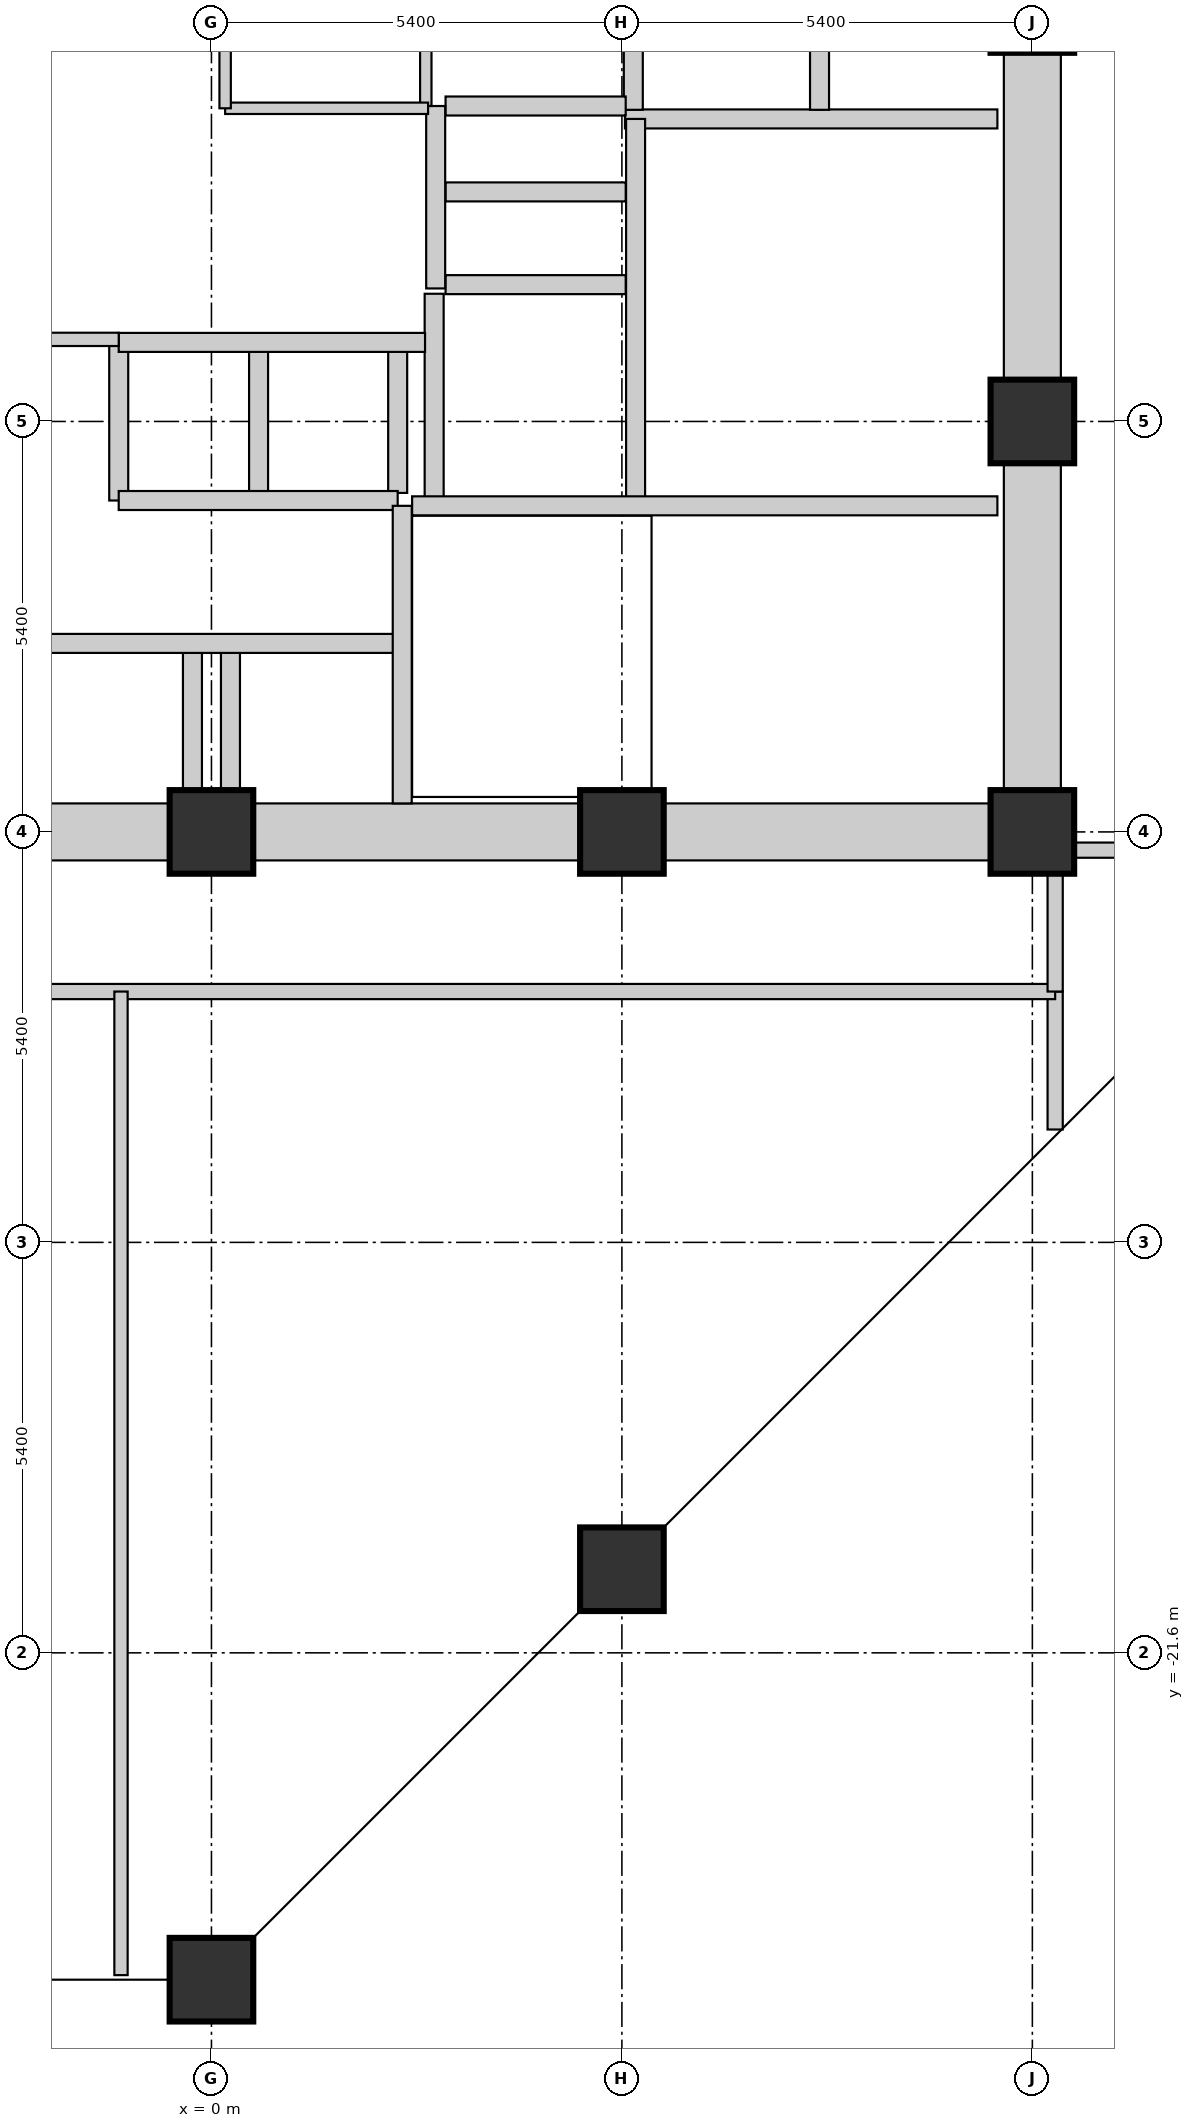
"""IFC4 building model, lengths in metres.
Left out: names, types, materials, properties, quantities, classifications, styles, units other than length and angle.
Written with IfcOpenShell. Run it as: python <this file> out.ifc"""

import sys

from ifc_helpers import new_model, si_unit, direction, frame, frame_2d, origin, origin_2d, place, context, subcontext, project, spatial, rectangle, extrude, element, fill, save


model = new_model("IFC4")
c1 = context("Model", 3, precision=1e-05, world=origin(), true_north=direction((0.0, 1.0)))
c2 = subcontext(c1, "Body", "Model", "MODEL_VIEW")
j1 = project(units=[si_unit("LENGTHUNIT", "METRE"), si_unit("PLANEANGLEUNIT", "RADIAN")], contexts=[c1])
p1 = place(None, origin())
s1 = spatial("IfcSite", under=j1, at=p1, CompositionType="ELEMENT")
p2 = place(p1, origin())
s2 = spatial("IfcBuilding", under=s1, at=p2, CompositionType="ELEMENT")
p3 = place(p2, frame((0.0, 0.0, 83.25)))
s3 = spatial("IfcBuildingStorey", under=s2, at=p3, CompositionType="ELEMENT", Elevation=83.25)
for number, where, z_axis, x_axis in (
    (1, (0.0, -25.9, 0.0), (0.0, 0.0, 1.0), (1.0, 0.0, 0.0)),
    (2, (0.0, -10.8, 0.0), (0.0, 0.0, 1.0), (1.0, 0.0, 0.0)),
    (3, (5.4, -20.5, 0.0), (0.0, 0.0, 1.0), (1.0, 0.0, 0.0)),
    (4, (5.4, -10.8, 0.0), (0.0, 0.0, 1.0), (1.0, 0.0, 0.0)),
    (5, (10.8, -10.8, 0.0), (0.0, 0.0, 1.0), (1.0, 0.0, 0.0)),
    (6, (10.8, -5.4, 0.0), (0.0, 0.0, 1.0), (1.0, 0.0, 0.0)),
):
    element("IfcColumn", number, at=place(p3, frame(where, z_axis=z_axis, x_axis=x_axis)), inside=s3, PredefinedType="COLUMN", context=c2, shape_type="SweptSolid", body=[
        extrude(rectangle(XDim=1.1, YDim=1.1, at=origin_2d()), origin(), (0.0, 0.0, 1.0), 3.75),
    ])
for number, where, z_axis, x_axis in (
    (7, (10.8, -10.24, 0.0), (0.0, 0.0, 1.0), (0.0, 1.0, 0.0)),
    (8, (-4.84, -10.8, 0.0), (0.0, 0.0, 1.0), (1.0, 0.0, 0.0)),
):
    element("IfcWall", number, at=place(p3, frame(where, z_axis=z_axis, x_axis=x_axis)), inside=s3, PredefinedType="SHEAR", context=c2, shape_type="SweptSolid", body=[
        extrude(rectangle(XDim=4.28, YDim=0.75, at=frame_2d((2.14, 0.0))), origin(), (0.0, 0.0, 1.0), 3.75),
    ])
p4 = place(p3, frame((10.8, -4.84, 0.0), z_axis=(0.0, 0.0, 1.0), x_axis=(0.0, 1.0, 0.0)))
e9 = element("IfcWall", 9, at=p4, inside=s3, PredefinedType="SHEAR", context=c2, shape_type="SweptSolid", body=[
    extrude(rectangle(XDim=4.28, YDim=0.75, at=frame_2d((2.14, 0.0))), origin(), (0.0, 0.0, 1.0), 3.75),
])
p5 = place(p4, frame((1.59, 0.0, 0.0)))
e10 = element("IfcOpeningElement", 10, at=p5, cuts=e9, PredefinedType="OPENING", context=c2, shape_type="SweptSolid", body=[
    extrude(rectangle(XDim=1.1, YDim=2.1, at=frame_2d((0.55, 1.05))), frame((0.0, 0.385, 0.0), z_axis=(0.0, -1.0, 0.0), x_axis=(1.0, 0.0, 0.0)), (0.0, 0.0, 1.0), 0.77),
])
for number, where, z_axis, x_axis in (
    (11, (0.56, -10.8, 0.0), (0.0, 0.0, 1.0), (1.0, 0.0, 0.0)),
    (12, (5.96, -10.8, 0.0), (0.0, 0.0, 1.0), (1.0, 0.0, 0.0)),
):
    element("IfcWall", number, at=place(p3, frame(where, z_axis=z_axis, x_axis=x_axis)), inside=s3, PredefinedType="SHEAR", context=c2, shape_type="SweptSolid", body=[
        extrude(rectangle(XDim=4.28, YDim=0.75, at=frame_2d((2.14, 0.0))), origin(), (0.0, 0.0, 1.0), 3.75),
    ])
p6 = place(p3, frame((2.93, -6.51, 0.0), z_axis=(0.0, 0.0, 1.0), x_axis=(0.0, 1.0, 0.0)))
e13 = element("IfcWall", 13, at=p6, inside=s3, PredefinedType="SHEAR", context=c2, shape_type="SweptSolid", body=[
    extrude(rectangle(XDim=2.79, YDim=0.25, at=frame_2d((1.395, 0.0))), origin(), (0.0, 0.0, 1.0), 3.75),
])
p7 = place(p3, frame((5.44, -1.42, 0.0), z_axis=(0.0, 0.0, 1.0), x_axis=(1.0, 0.0, 0.0)))
e14 = element("IfcWall", 14, at=p7, inside=s3, PredefinedType="SHEAR", context=c2, shape_type="SweptSolid", body=[
    extrude(rectangle(XDim=4.9, YDim=0.25, at=frame_2d((2.45, 0.0))), origin(), (0.0, 0.0, 1.0), 3.75),
])
p8 = place(p3, frame((3.08, -3.6, 0.0), z_axis=(0.0, 0.0, 1.0), x_axis=(1.0, 0.0, 0.0)))
e15 = element("IfcWall", 15, at=p8, inside=s3, PredefinedType="SHEAR", context=c2, shape_type="SweptSolid", body=[
    extrude(rectangle(XDim=2.37, YDim=0.25, at=frame_2d((1.185, 0.0))), origin(), (0.0, 0.0, 1.0), 3.75),
])
p9 = place(p3, frame((5.58, -6.51, 0.0), z_axis=(0.0, 0.0, 1.0), x_axis=(0.0, 1.0, 0.0)))
e16 = element("IfcWall", 16, at=p9, inside=s3, PredefinedType="SHEAR", context=c2, shape_type="SweptSolid", body=[
    extrude(rectangle(XDim=5.09, YDim=0.25, at=frame_2d((2.545, 0.0))), origin(), (0.0, 0.0, 1.0), 3.75),
])
p10 = place(p9, frame((0.85, 0.0, 0.0)))
e17 = element("IfcOpeningElement", 17, at=p10, cuts=e16, PredefinedType="OPENING", context=c2, shape_type="SweptSolid", body=[
    extrude(rectangle(XDim=1.1, YDim=2.1, at=frame_2d((0.55, 1.05))), frame((0.0, 0.135, 0.0), z_axis=(0.0, -1.0, 0.0), x_axis=(1.0, 0.0, 0.0)), (0.0, 0.0, 1.0), 0.27),
])
for number, where, z_axis, x_axis in (
    (18, (0.62, -6.34, 0.0), (0.0, 0.0, 1.0), (0.0, 1.0, 0.0)),
    (19, (2.45, -6.34, 0.0), (0.0, 0.0, 1.0), (0.0, 1.0, 0.0)),
):
    element("IfcWall", number, at=place(p3, frame(where, z_axis=z_axis, x_axis=x_axis)), inside=s3, PredefinedType="SHEAR", context=c2, shape_type="SweptSolid", body=[
        extrude(rectangle(XDim=1.88, YDim=0.25, at=frame_2d((0.94, 0.0))), origin(), (0.0, 0.0, 1.0), 3.75),
    ])
for number, where, z_axis, x_axis in (
    (20, (-0.25, -10.25, 0.0), (0.0, 0.0, 1.0), (0.0, 1.0, 0.0)),
    (21, (0.25, -10.25, 0.0), (0.0, 0.0, 1.0), (0.0, 1.0, 0.0)),
):
    element("IfcWall", number, at=place(p3, frame(where, z_axis=z_axis, x_axis=x_axis)), inside=s3, PredefinedType="SHEAR", context=c2, shape_type="SweptSolid", body=[
        extrude(rectangle(XDim=1.81, YDim=0.25, at=frame_2d((0.905, 0.0))), origin(), (0.0, 0.0, 1.0), 3.75),
    ])
p11 = place(p3, frame((-1.22, -6.44, 0.0), z_axis=(0.0, 0.0, 1.0), x_axis=(0.0, 1.0, 0.0)))
e22 = element("IfcWall", 22, at=p11, inside=s3, PredefinedType="SHEAR", context=c2, shape_type="SweptSolid", body=[
    extrude(rectangle(XDim=2.08, YDim=0.25, at=frame_2d((1.04, 0.0))), origin(), (0.0, 0.0, 1.0), 3.75),
])
p12 = place(p3, frame((-1.22, -6.44, 0.0), z_axis=(0.0, 0.0, 1.0), x_axis=(1.0, 0.0, 0.0)))
e23 = element("IfcWall", 23, at=p12, inside=s3, PredefinedType="SHEAR", context=c2, shape_type="SweptSolid", body=[
    extrude(rectangle(XDim=3.67, YDim=0.25, at=frame_2d((1.835, 0.0))), origin(), (0.0, 0.0, 1.0), 3.75),
])
p13 = place(p3, frame((-2.48, -8.32, 0.0), z_axis=(0.0, 0.0, 1.0), x_axis=(1.0, 0.0, 0.0)))
e24 = element("IfcWall", 24, at=p13, inside=s3, PredefinedType="SHEAR", context=c2, shape_type="SweptSolid", body=[
    extrude(rectangle(XDim=4.93, YDim=0.25, at=frame_2d((2.465, 0.0))), origin(), (0.0, 0.0, 1.0), 3.75),
])
p14 = place(p3, frame((-1.22, -4.36, 0.0), z_axis=(0.0, 0.0, 1.0), x_axis=(1.0, 0.0, 0.0)))
e25 = element("IfcWall", 25, at=p14, inside=s3, PredefinedType="SHEAR", context=c2, shape_type="SweptSolid", body=[
    extrude(rectangle(XDim=4.03, YDim=0.25, at=frame_2d((2.015, 0.0))), origin(), (0.0, 0.0, 1.0), 3.75),
])
for number, where, z_axis, x_axis in (
    (26, (5.55, -1.3, 0.0), (0.0, 0.0, 1.0), (0.0, 1.0, 0.0)),
    (27, (8.0, -1.3, 0.0), (0.0, 0.0, 1.0), (0.0, 1.0, 0.0)),
):
    element("IfcWall", number, at=place(p3, frame(where, z_axis=z_axis, x_axis=x_axis)), inside=s3, PredefinedType="SHEAR", context=c2, shape_type="SweptSolid", body=[
        extrude(rectangle(XDim=2.04, YDim=0.25, at=frame_2d((1.02, 0.0))), origin(), (0.0, 0.0, 1.0), 3.75),
    ])
for number, where, z_axis, x_axis in (
    (28, (3.08, -2.38, 0.0), (0.0, 0.0, 1.0), (1.0, 0.0, 0.0)),
    (29, (3.08, -1.25, 0.0), (0.0, 0.0, 1.0), (1.0, 0.0, 0.0)),
):
    element("IfcWall", number, at=place(p3, frame(where, z_axis=z_axis, x_axis=x_axis)), inside=s3, PredefinedType="SHEAR", context=c2, shape_type="SweptSolid", body=[
        extrude(rectangle(XDim=2.37, YDim=0.25, at=frame_2d((1.185, 0.0))), origin(), (0.0, 0.0, 1.0), 3.75),
    ])
p15 = place(p3, frame((2.95, -3.65, 0.0), z_axis=(0.0, 0.0, 1.0), x_axis=(0.0, 1.0, 0.0)))
e30 = element("IfcWall", 30, at=p15, inside=s3, PredefinedType="SHEAR", context=c2, shape_type="SweptSolid", body=[
    extrude(rectangle(XDim=2.4, YDim=0.25, at=frame_2d((1.2, 0.0))), origin(), (0.0, 0.0, 1.0), 3.75),
])
p16 = place(p15, frame((0.775, 0.0, 0.0)))
e31 = element("IfcOpeningElement", 31, at=p16, cuts=e30, PredefinedType="OPENING", context=c2, shape_type="SweptSolid", body=[
    extrude(rectangle(XDim=0.85, YDim=2.1, at=frame_2d((0.425, 1.05))), frame((0.0, 0.135, 0.0), z_axis=(0.0, -1.0, 0.0), x_axis=(1.0, 0.0, 0.0)), (0.0, 0.0, 1.0), 0.27),
])
p17 = place(p3, frame((2.64, -6.51, 0.0), z_axis=(0.0, 0.0, 1.0), x_axis=(1.0, 0.0, 0.0)))
e32 = element("IfcWall", 32, at=p17, inside=s3, PredefinedType="SHEAR", context=c2, shape_type="SweptSolid", body=[
    extrude(rectangle(XDim=7.7, YDim=0.25, at=frame_2d((3.85, 0.0))), origin(), (0.0, 0.0, 1.0), 3.75),
])
p18 = place(p17, frame((6.0, 0.0, 0.0)))
e33 = element("IfcOpeningElement", 33, at=p18, cuts=e32, PredefinedType="OPENING", context=c2, shape_type="SweptSolid", body=[
    extrude(rectangle(XDim=0.95, YDim=2.1, at=frame_2d((0.475, 1.05))), frame((0.0, 0.135, 0.0), z_axis=(0.0, -1.0, 0.0), x_axis=(1.0, 0.0, 0.0)), (0.0, 0.0, 1.0), 0.27),
])
p19 = place(p3, frame((2.51, -10.425, 0.0), z_axis=(0.0, 0.0, 1.0), x_axis=(0.0, 1.0, 0.0)))
e34 = element("IfcWall", 34, at=p19, inside=s3, PredefinedType="SHEAR", context=c2, shape_type="SweptSolid", body=[
    extrude(rectangle(XDim=3.915, YDim=0.25, at=frame_2d((1.958, 0.0))), origin(), (0.0, 0.0, 1.0), 3.75),
])
p20 = place(p3, frame((2.82, -1.25, 0.0), z_axis=(0.0, 0.0, 1.0), x_axis=(0.0, 1.0, 0.0)))
e35 = element("IfcWall", 35, at=p20, inside=s3, PredefinedType="PARTITIONING", context=c2, shape_type="SweptSolid", body=[
    extrude(rectangle(XDim=2.77, YDim=0.15, at=frame_2d((1.385, 0.0))), origin(), (0.0, 0.0, 1.0), 3.57),
])
p21 = place(p3, frame((0.18, -1.28, 0.0), z_axis=(0.0, 0.0, 1.0), x_axis=(1.0, 0.0, 0.0)))
e36 = element("IfcWall", 36, at=p21, inside=s3, PredefinedType="PARTITIONING", context=c2, shape_type="SweptSolid", body=[
    extrude(rectangle(XDim=2.67, YDim=0.15, at=frame_2d((1.335, 0.0))), origin(), (0.0, 0.0, 1.0), 3.57),
])
p22 = place(p3, frame((0.18, -1.28, 0.0), z_axis=(0.0, 0.0, 1.0), x_axis=(0.0, 1.0, 0.0)))
e37 = element("IfcWall", 37, at=p22, inside=s3, PredefinedType="PARTITIONING", context=c2, shape_type="SweptSolid", body=[
    extrude(rectangle(XDim=2.8, YDim=0.15, at=frame_2d((1.4, 0.0))), origin(), (0.0, 0.0, 1.0), 3.57),
])
p23 = place(p22, frame((0.85, 0.0, 0.0)))
e38 = element("IfcOpeningElement", 38, at=p23, cuts=e37, PredefinedType="OPENING", context=c2, shape_type="SweptSolid", body=[
    extrude(rectangle(XDim=0.85, YDim=2.1, at=frame_2d((0.425, 1.05))), frame((0.0, 0.085, 0.0), z_axis=(0.0, -1.0, 0.0), x_axis=(1.0, 0.0, 0.0)), (0.0, 0.0, 1.0), 0.17),
])
p24 = place(p3, frame((-2.52, -4.32, 0.0), z_axis=(0.0, 0.0, 1.0), x_axis=(1.0, 0.0, 0.0)))
e39 = element("IfcWall", 39, at=p24, inside=s3, PredefinedType="PARTITIONING", context=c2, shape_type="SweptSolid", body=[
    extrude(rectangle(XDim=1.3, YDim=0.175, at=frame_2d((0.65, 0.0))), origin(), (0.0, 0.0, 1.0), 3.57),
])
p25 = place(p24, frame((0.22, 0.0, 0.0)))
e40 = element("IfcOpeningElement", 40, at=p25, cuts=e39, PredefinedType="OPENING", context=c2, shape_type="SweptSolid", body=[
    extrude(rectangle(XDim=0.85, YDim=2.1, at=frame_2d((0.425, 1.05))), frame((0.0, 0.097, 0.0), z_axis=(0.0, -1.0, 0.0), x_axis=(1.0, 0.0, 0.0)), (0.0, 0.0, 1.0), 0.195),
])
p26 = place(p3, frame((11.1, -14.715, 0.0), z_axis=(0.0, 0.0, 1.0), x_axis=(0.0, 1.0, 0.0)))
e41 = element("IfcWall", 41, at=p26, inside=s3, PredefinedType="PARTITIONING", context=c2, shape_type="SweptSolid", body=[
    extrude(rectangle(XDim=1.815, YDim=0.2, at=frame_2d((0.908, 0.0))), origin(), (0.0, 0.0, 1.0), 3.57),
])
p27 = place(p3, frame((10.85, -11.04, 0.0), z_axis=(0.0, 0.0, 1.0), x_axis=(1.0, 0.0, 0.0)))
e42 = element("IfcWall", 42, at=p27, inside=s3, PredefinedType="PARTITIONING", context=c2, shape_type="SweptSolid", body=[
    extrude(rectangle(XDim=2.63, YDim=0.2, at=frame_2d((1.315, 0.0))), origin(), (0.0, 0.0, 1.0), 3.57),
])
p28 = place(p3, frame((-13.48, -12.9, 0.0), z_axis=(0.0, 0.0, 1.0), x_axis=(1.0, 0.0, 0.0)))
e43 = element("IfcWall", 43, at=p28, inside=s3, PredefinedType="PARTITIONING", context=c2, shape_type="SweptSolid", body=[
    extrude(rectangle(XDim=24.58, YDim=0.2, at=frame_2d((12.29, 0.0))), origin(), (0.0, 0.0, 1.0), 2.933),
])
p29 = place(p28, frame((5.695, 0.0, 0.0)))
e44 = element("IfcOpeningElement", 44, at=p29, cuts=e43, PredefinedType="OPENING", context=c2, shape_type="SweptSolid", body=[
    extrude(rectangle(XDim=0.85, YDim=2.1, at=frame_2d((0.425, 1.05))), frame((0.0, 0.11, 0.0), z_axis=(0.0, -1.0, 0.0), x_axis=(1.0, 0.0, 0.0)), (0.0, 0.0, 1.0), 0.22),
])
p30 = place(p28, frame((15.794, 0.0, 0.0)))
e45 = element("IfcOpeningElement", 45, at=p30, cuts=e43, PredefinedType="OPENING", context=c2, shape_type="SweptSolid", body=[
    extrude(rectangle(XDim=0.85, YDim=2.1, at=frame_2d((0.425, 1.05))), frame((0.0, 0.11, 0.0), z_axis=(0.0, -1.0, 0.0), x_axis=(1.0, 0.0, 0.0)), (0.0, 0.0, 1.0), 0.22),
])
p31 = place(p3, frame((11.1, -12.9, 0.0), z_axis=(0.0, 0.0, 1.0), x_axis=(0.0, 1.0, 0.0)))
e46 = element("IfcWall", 46, at=p31, inside=s3, PredefinedType="PARTITIONING", context=c2, shape_type="SweptSolid", body=[
    extrude(rectangle(XDim=1.86, YDim=0.2, at=frame_2d((0.93, 0.0))), origin(), (0.0, 0.0, 1.0), 3.57),
])
p32 = place(p3, frame((-1.19, -25.84, 0.0), z_axis=(0.0, 0.0, 1.0), x_axis=(0.0, 1.0, 0.0)))
e47 = element("IfcWall", 47, at=p32, inside=s3, PredefinedType="PARTITIONING", context=c2, shape_type="SweptSolid", body=[
    extrude(rectangle(XDim=12.94, YDim=0.175, at=frame_2d((6.47, 0.0))), origin(), (0.0, 0.0, 1.0), 2.699),
])
p33 = place(p18, origin())
e48 = element("IfcDoor", 48, at=p33, inside=s3, OperationType="SINGLE_SWING_RIGHT", PredefinedType="DOOR", context=c2, shape_type="SweptSolid", body=[
    extrude(rectangle(XDim=0.95, YDim=2.1, at=frame_2d((0.475, 1.05))), frame((0.0, 0.025, 0.0), z_axis=(0.0, -1.0, 0.0), x_axis=(1.0, 0.0, 0.0)), (0.0, 0.0, 1.0), 0.05),
])
fill(e33, e48)
p34 = place(p16, origin())
e49 = element("IfcDoor", 49, at=p34, inside=s3, OperationType="SINGLE_SWING_LEFT", PredefinedType="DOOR", context=c2, shape_type="SweptSolid", body=[
    extrude(rectangle(XDim=0.85, YDim=2.1, at=frame_2d((0.425, 1.05))), frame((0.0, 0.025, 0.0), z_axis=(0.0, -1.0, 0.0), x_axis=(1.0, 0.0, 0.0)), (0.0, 0.0, 1.0), 0.05),
])
fill(e31, e49)
p35 = place(p5, origin())
e50 = element("IfcDoor", 50, at=p35, inside=s3, OperationType="SINGLE_SWING_RIGHT", PredefinedType="DOOR", context=c2, shape_type="SweptSolid", body=[
    extrude(rectangle(XDim=1.1, YDim=2.1, at=frame_2d((0.55, 1.05))), frame((0.0, 0.025, 0.0), z_axis=(0.0, -1.0, 0.0), x_axis=(1.0, 0.0, 0.0)), (0.0, 0.0, 1.0), 0.05),
])
fill(e10, e50)
p36 = place(p10, origin())
e51 = element("IfcDoor", 51, at=p36, inside=s3, OperationType="SLIDING_TO_RIGHT", PredefinedType="DOOR", context=c2, shape_type="SweptSolid", body=[
    extrude(rectangle(XDim=1.1, YDim=2.1, at=frame_2d((0.55, 1.05))), frame((0.0, 0.025, 0.0), z_axis=(0.0, -1.0, 0.0), x_axis=(1.0, 0.0, 0.0)), (0.0, 0.0, 1.0), 0.05),
])
fill(e17, e51)
p37 = place(p25, origin())
e52 = element("IfcDoor", 52, at=p37, inside=s3, OperationType="SINGLE_SWING_LEFT", PredefinedType="DOOR", context=c2, shape_type="SweptSolid", body=[
    extrude(rectangle(XDim=0.85, YDim=2.1, at=frame_2d((0.425, 1.05))), frame((0.0, 0.025, 0.0), z_axis=(0.0, -1.0, 0.0), x_axis=(1.0, 0.0, 0.0)), (0.0, 0.0, 1.0), 0.05),
])
fill(e40, e52)
p38 = place(p30, origin())
e53 = element("IfcDoor", 53, at=p38, inside=s3, OperationType="SINGLE_SWING_RIGHT", PredefinedType="DOOR", context=c2, shape_type="SweptSolid", body=[
    extrude(rectangle(XDim=0.85, YDim=2.1, at=frame_2d((0.425, 1.05))), frame((0.0, 0.025, 0.0), z_axis=(0.0, -1.0, 0.0), x_axis=(1.0, 0.0, 0.0)), (0.0, 0.0, 1.0), 0.05),
])
fill(e45, e53)
save(model, sys.argv[1])
